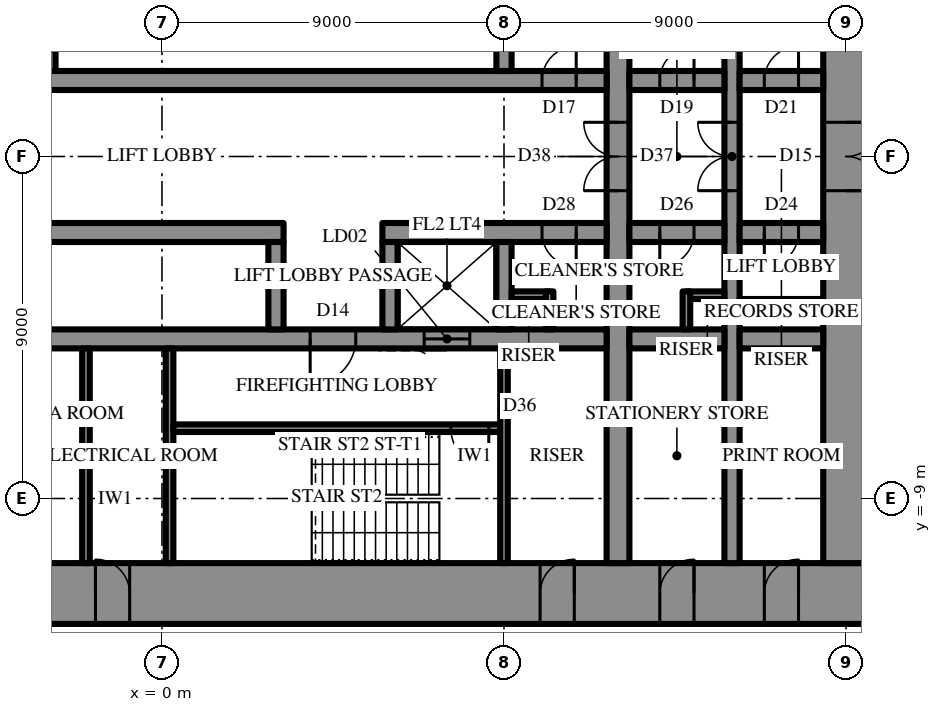
"""IFC4 building model, lengths in metres.
Left out: names, types, materials, properties, quantities, classifications, styles, units other than length and angle.
Written with IfcOpenShell. Run it as: python <this file> out.ifc"""

import sys

from ifc_helpers import new_model, si_unit, direction, frame, frame_2d, origin, place, context, subcontext, project, spatial, rectangle, extrude, element, fill, save


model = new_model("IFC4")
c1 = context("Model", 3, precision=1e-05, world=origin(), true_north=direction((0.0, 1.0)))
c2 = subcontext(c1, "Body", "Model", "MODEL_VIEW")
j1 = project(units=[si_unit("LENGTHUNIT", "METRE"), si_unit("PLANEANGLEUNIT", "RADIAN")], contexts=[c1])
p1 = place(None, origin())
s1 = spatial("IfcSite", under=j1, at=p1, CompositionType="ELEMENT")
p2 = place(p1, origin())
s2 = spatial("IfcBuilding", under=s1, at=p2, CompositionType="ELEMENT")
p3 = place(p2, frame((0.0, 0.0, -9.0)))
s3 = spatial("IfcBuildingStorey", under=s2, at=p3, CompositionType="ELEMENT", Elevation=-9.0)
p4 = place(p3, frame((18.6, -11.5, 0.0), z_axis=(0.0, 0.0, 1.0), x_axis=(-1.0, 0.0, 0.0)))
e1 = element("IfcWall", 1, at=p4, inside=s3, PredefinedType="SHEAR", context=c2, shape_type="SweptSolid", body=[
    extrude(rectangle(XDim=37.2, YDim=1.6, at=frame_2d((18.6, 0.0))), origin(), (0.0, 0.0, 1.0), 4.5),
])
p5 = place(p4, frame((19.45, 0.0, 0.0)))
e2 = element("IfcOpeningElement", 2, at=p5, cuts=e1, PredefinedType="OPENING", context=c2, shape_type="SweptSolid", body=[
    extrude(rectangle(XDim=0.9, YDim=2.2, at=frame_2d((0.45, 1.1))), frame((0.0, 0.81, 0.0), z_axis=(0.0, -1.0, 0.0), x_axis=(1.0, 0.0, 0.0)), (0.0, 0.0, 1.0), 1.62),
])
p6 = place(p4, frame((22.45, 0.0, 0.0)))
e3 = element("IfcOpeningElement", 3, at=p6, cuts=e1, PredefinedType="OPENING", context=c2, shape_type="SweptSolid", body=[
    extrude(rectangle(XDim=0.9, YDim=2.2, at=frame_2d((0.45, 1.1))), frame((0.0, 0.81, 0.0), z_axis=(0.0, -1.0, 0.0), x_axis=(1.0, 0.0, 0.0)), (0.0, 0.0, 1.0), 1.62),
])
p7 = place(p4, frame((25.5, 0.0, 0.0)))
e4 = element("IfcOpeningElement", 4, at=p7, cuts=e1, PredefinedType="OPENING", context=c2, shape_type="SweptSolid", body=[
    extrude(rectangle(XDim=1.0, YDim=2.2, at=frame_2d((0.5, 1.1))), frame((0.0, 0.81, 0.0), z_axis=(0.0, -1.0, 0.0), x_axis=(1.0, 0.0, 0.0)), (0.0, 0.0, 1.0), 1.62),
])
p8 = place(p4, frame((1.85, 0.0, 0.0)))
e5 = element("IfcOpeningElement", 5, at=p8, cuts=e1, PredefinedType="OPENING", context=c2, shape_type="SweptSolid", body=[
    extrude(rectangle(XDim=0.9, YDim=2.2, at=frame_2d((0.45, 1.1))), frame((0.0, 0.81, 0.0), z_axis=(0.0, -1.0, 0.0), x_axis=(1.0, 0.0, 0.0)), (0.0, 0.0, 1.0), 1.62),
])
p9 = place(p4, frame((4.6, 0.0, 0.0)))
e6 = element("IfcOpeningElement", 6, at=p9, cuts=e1, PredefinedType="OPENING", context=c2, shape_type="SweptSolid", body=[
    extrude(rectangle(XDim=0.9, YDim=2.2, at=frame_2d((0.45, 1.1))), frame((0.0, 0.81, 0.0), z_axis=(0.0, -1.0, 0.0), x_axis=(1.0, 0.0, 0.0)), (0.0, 0.0, 1.0), 1.62),
])
p10 = place(p4, frame((7.75, 0.0, 0.0)))
e7 = element("IfcOpeningElement", 7, at=p10, cuts=e1, PredefinedType="OPENING", context=c2, shape_type="SweptSolid", body=[
    extrude(rectangle(XDim=0.9, YDim=2.2, at=frame_2d((0.45, 1.1))), frame((0.0, 0.81, 0.0), z_axis=(0.0, -1.0, 0.0), x_axis=(1.0, 0.0, 0.0)), (0.0, 0.0, 1.0), 1.62),
])
p11 = place(p4, frame((28.55, 0.0, 0.0)))
e8 = element("IfcOpeningElement", 8, at=p11, cuts=e1, PredefinedType="OPENING", context=c2, shape_type="SweptSolid", body=[
    extrude(rectangle(XDim=0.9, YDim=2.2, at=frame_2d((0.45, 1.1))), frame((0.0, 0.81, 0.0), z_axis=(0.0, -1.0, 0.0), x_axis=(1.0, 0.0, 0.0)), (0.0, 0.0, 1.0), 1.62),
])
p12 = place(p4, frame((31.7, 0.0, 0.0)))
e9 = element("IfcOpeningElement", 9, at=p12, cuts=e1, PredefinedType="OPENING", context=c2, shape_type="SweptSolid", body=[
    extrude(rectangle(XDim=0.9, YDim=2.2, at=frame_2d((0.45, 1.1))), frame((0.0, 0.81, 0.0), z_axis=(0.0, -1.0, 0.0), x_axis=(1.0, 0.0, 0.0)), (0.0, 0.0, 1.0), 1.62),
])
p13 = place(p4, frame((34.45, 0.0, 0.0)))
e10 = element("IfcOpeningElement", 10, at=p13, cuts=e1, PredefinedType="OPENING", context=c2, shape_type="SweptSolid", body=[
    extrude(rectangle(XDim=0.9, YDim=2.2, at=frame_2d((0.45, 1.1))), frame((0.0, 0.81, 0.0), z_axis=(0.0, -1.0, 0.0), x_axis=(1.0, 0.0, 0.0)), (0.0, 0.0, 1.0), 1.62),
])
p14 = place(p3, frame((18.0, -10.7, 0.0), z_axis=(0.0, 0.0, 1.0), x_axis=(0.0, 1.0, 0.0)))
e11 = element("IfcWall", 11, at=p14, inside=s3, PredefinedType="SHEAR", context=c2, shape_type="SweptSolid", body=[
    extrude(rectangle(XDim=21.4, YDim=1.2, at=frame_2d((10.7, 0.0))), origin(), (0.0, 0.0, 1.0), 4.5),
])
p15 = place(p14, frame((9.8, 0.0, 0.0)))
e12 = element("IfcOpeningElement", 12, at=p15, cuts=e11, PredefinedType="OPENING", context=c2, shape_type="SweptSolid", body=[
    extrude(rectangle(XDim=1.8, YDim=2.4, at=frame_2d((0.9, 1.2))), frame((0.0, 0.61, 0.0), z_axis=(0.0, -1.0, 0.0), x_axis=(1.0, 0.0, 0.0)), (0.0, 0.0, 1.0), 1.22),
])
p16 = place(p3, frame((12.0, -10.7, 0.0), z_axis=(0.0, 0.0, 1.0), x_axis=(0.0, 1.0, 0.0)))
e13 = element("IfcWall", 13, at=p16, inside=s3, PredefinedType="SHEAR", context=c2, shape_type="SweptSolid", body=[
    extrude(rectangle(XDim=21.4, YDim=0.6, at=frame_2d((10.7, 0.0))), origin(), (0.0, 0.0, 1.0), 4.5),
])
p17 = place(p16, frame((9.8, 0.0, 0.0)))
e14 = element("IfcOpeningElement", 14, at=p17, cuts=e13, PredefinedType="OPENING", context=c2, shape_type="SweptSolid", body=[
    extrude(rectangle(XDim=1.8, YDim=2.4, at=frame_2d((0.9, 1.2))), frame((0.0, 0.31, 0.0), z_axis=(0.0, -1.0, 0.0), x_axis=(1.0, 0.0, 0.0)), (0.0, 0.0, 1.0), 0.62),
])
p18 = place(p3, frame((15.0, -10.7, 0.0), z_axis=(0.0, 0.0, 1.0), x_axis=(0.0, 1.0, 0.0)))
e15 = element("IfcWall", 15, at=p18, inside=s3, PredefinedType="SHEAR", context=c2, shape_type="SweptSolid", body=[
    extrude(rectangle(XDim=21.4, YDim=0.4, at=frame_2d((10.7, 0.0))), origin(), (0.0, 0.0, 1.0), 4.5),
])
p19 = place(p18, frame((9.8, 0.0, 0.0)))
e16 = element("IfcOpeningElement", 16, at=p19, cuts=e15, PredefinedType="OPENING", context=c2, shape_type="SweptSolid", body=[
    extrude(rectangle(XDim=1.8, YDim=2.4, at=frame_2d((0.9, 1.2))), frame((0.0, 0.21, 0.0), z_axis=(0.0, -1.0, 0.0), x_axis=(1.0, 0.0, 0.0)), (0.0, 0.0, 1.0), 0.42),
])
p20 = place(p3, frame((-3.2, 2.0, 0.0), z_axis=(0.0, 0.0, 1.0), x_axis=(1.0, 0.0, 0.0)))
e17 = element("IfcWall", 17, at=p20, inside=s3, PredefinedType="SHEAR", context=c2, shape_type="SweptSolid", body=[
    extrude(rectangle(XDim=14.9, YDim=0.5, at=frame_2d((7.45, 0.0))), origin(), (0.0, 0.0, 1.0), 4.5),
])
p21 = place(p20, frame((13.2, 0.0, 0.0)))
e18 = element("IfcOpeningElement", 18, at=p21, cuts=e17, PredefinedType="OPENING", context=c2, shape_type="SweptSolid", body=[
    extrude(rectangle(XDim=0.9, YDim=2.2, at=frame_2d((0.45, 1.1))), frame((0.0, 0.26, 0.0), z_axis=(0.0, -1.0, 0.0), x_axis=(1.0, 0.0, 0.0)), (0.0, 0.0, 1.0), 0.52),
])
p22 = place(p3, frame((12.3, 2.0, 0.0), z_axis=(0.0, 0.0, 1.0), x_axis=(1.0, 0.0, 0.0)))
e19 = element("IfcWall", 19, at=p22, inside=s3, PredefinedType="SHEAR", context=c2, shape_type="SweptSolid", body=[
    extrude(rectangle(XDim=2.5, YDim=0.5, at=frame_2d((1.25, 0.0))), origin(), (0.0, 0.0, 1.0), 4.5),
])
p23 = place(p22, frame((0.8, 0.0, 0.0)))
e20 = element("IfcOpeningElement", 20, at=p23, cuts=e19, PredefinedType="OPENING", context=c2, shape_type="SweptSolid", body=[
    extrude(rectangle(XDim=0.9, YDim=2.2, at=frame_2d((0.45, 1.1))), frame((0.0, 0.26, 0.0), z_axis=(0.0, -1.0, 0.0), x_axis=(1.0, 0.0, 0.0)), (0.0, 0.0, 1.0), 0.52),
])
p24 = place(p3, frame((15.2, 2.0, 0.0), z_axis=(0.0, 0.0, 1.0), x_axis=(1.0, 0.0, 0.0)))
e21 = element("IfcWall", 21, at=p24, inside=s3, PredefinedType="SHEAR", context=c2, shape_type="SweptSolid", body=[
    extrude(rectangle(XDim=2.2, YDim=0.5, at=frame_2d((1.1, 0.0))), origin(), (0.0, 0.0, 1.0), 4.5),
])
p25 = place(p24, frame((0.65, 0.0, 0.0)))
e22 = element("IfcOpeningElement", 22, at=p25, cuts=e21, PredefinedType="OPENING", context=c2, shape_type="SweptSolid", body=[
    extrude(rectangle(XDim=0.9, YDim=2.2, at=frame_2d((0.45, 1.1))), frame((0.0, 0.26, 0.0), z_axis=(0.0, -1.0, 0.0), x_axis=(1.0, 0.0, 0.0)), (0.0, 0.0, 1.0), 0.52),
])
for number, where, z_axis, x_axis in (
    (23, (-3.0, 2.25, 0.0), (0.0, 0.0, 1.0), (0.0, 1.0, 0.0)),
    (24, (9.0, 2.25, 0.0), (0.0, 0.0, 1.0), (0.0, 1.0, 0.0)),
):
    element("IfcWall", number, at=place(p3, frame(where, z_axis=z_axis, x_axis=x_axis)), inside=s3, PredefinedType="SHEAR", context=c2, shape_type="SweptSolid", body=[
        extrude(rectangle(XDim=2.3, YDim=0.4, at=frame_2d((1.15, 0.0))), origin(), (0.0, 0.0, 1.0), 4.5),
    ])
p26 = place(p3, frame((17.4, -2.0, 0.0), z_axis=(0.0, 0.0, 1.0), x_axis=(-1.0, 0.0, 0.0)))
e25 = element("IfcWall", 25, at=p26, inside=s3, PredefinedType="SHEAR", context=c2, shape_type="SweptSolid", body=[
    extrude(rectangle(XDim=2.2, YDim=0.5, at=frame_2d((1.1, 0.0))), origin(), (0.0, 0.0, 1.0), 4.5),
])
p27 = place(p26, frame((0.65, 0.0, 0.0)))
e26 = element("IfcOpeningElement", 26, at=p27, cuts=e25, PredefinedType="OPENING", context=c2, shape_type="SweptSolid", body=[
    extrude(rectangle(XDim=0.9, YDim=2.2, at=frame_2d((0.45, 1.1))), frame((0.0, 0.26, 0.0), z_axis=(0.0, -1.0, 0.0), x_axis=(1.0, 0.0, 0.0)), (0.0, 0.0, 1.0), 0.52),
])
p28 = place(p3, frame((14.8, -2.0, 0.0), z_axis=(0.0, 0.0, 1.0), x_axis=(-1.0, 0.0, 0.0)))
e27 = element("IfcWall", 27, at=p28, inside=s3, PredefinedType="SHEAR", context=c2, shape_type="SweptSolid", body=[
    extrude(rectangle(XDim=2.5, YDim=0.5, at=frame_2d((1.25, 0.0))), origin(), (0.0, 0.0, 1.0), 4.5),
])
p29 = place(p28, frame((0.8, 0.0, 0.0)))
e28 = element("IfcOpeningElement", 28, at=p29, cuts=e27, PredefinedType="OPENING", context=c2, shape_type="SweptSolid", body=[
    extrude(rectangle(XDim=0.9, YDim=2.2, at=frame_2d((0.45, 1.1))), frame((0.0, 0.26, 0.0), z_axis=(0.0, -1.0, 0.0), x_axis=(1.0, 0.0, 0.0)), (0.0, 0.0, 1.0), 0.52),
])
p30 = place(p3, frame((11.7, -2.0, 0.0), z_axis=(0.0, 0.0, 1.0), x_axis=(-1.0, 0.0, 0.0)))
e29 = element("IfcWall", 29, at=p30, inside=s3, PredefinedType="SHEAR", context=c2, shape_type="SweptSolid", body=[
    extrude(rectangle(XDim=5.9, YDim=0.5, at=frame_2d((2.95, 0.0))), origin(), (0.0, 0.0, 1.0), 4.5),
])
p31 = place(p30, frame((0.8, 0.0, 0.0)))
e30 = element("IfcOpeningElement", 30, at=p31, cuts=e29, PredefinedType="OPENING", context=c2, shape_type="SweptSolid", body=[
    extrude(rectangle(XDim=0.9, YDim=2.2, at=frame_2d((0.45, 1.1))), frame((0.0, 0.26, 0.0), z_axis=(0.0, -1.0, 0.0), x_axis=(1.0, 0.0, 0.0)), (0.0, 0.0, 1.0), 0.52),
])
p32 = place(p3, frame((3.2, -2.0, 0.0), z_axis=(0.0, 0.0, 1.0), x_axis=(-1.0, 0.0, 0.0)))
e31 = element("IfcWall", 31, at=p32, inside=s3, PredefinedType="SHEAR", context=c2, shape_type="SweptSolid", body=[
    extrude(rectangle(XDim=14.9, YDim=0.5, at=frame_2d((7.45, 0.0))), origin(), (0.0, 0.0, 1.0), 4.5),
])
p33 = place(p32, frame((13.2, 0.0, 0.0)))
e32 = element("IfcOpeningElement", 32, at=p33, cuts=e31, PredefinedType="OPENING", context=c2, shape_type="SweptSolid", body=[
    extrude(rectangle(XDim=0.9, YDim=2.2, at=frame_2d((0.45, 1.1))), frame((0.0, 0.26, 0.0), z_axis=(0.0, -1.0, 0.0), x_axis=(1.0, 0.0, 0.0)), (0.0, 0.0, 1.0), 0.52),
])
p34 = place(p3, frame((17.4, -4.8, 0.0), z_axis=(0.0, 0.0, 1.0), x_axis=(-1.0, 0.0, 0.0)))
e33 = element("IfcWall", 33, at=p34, inside=s3, PredefinedType="SHEAR", context=c2, shape_type="SweptSolid", body=[
    extrude(rectangle(XDim=2.2, YDim=0.5, at=frame_2d((1.1, 0.0))), origin(), (0.0, 0.0, 1.0), 4.5),
])
p35 = place(p3, frame((14.8, -4.8, 0.0), z_axis=(0.0, 0.0, 1.0), x_axis=(-1.0, 0.0, 0.0)))
e34 = element("IfcWall", 34, at=p35, inside=s3, PredefinedType="SHEAR", context=c2, shape_type="SweptSolid", body=[
    extrude(rectangle(XDim=2.5, YDim=0.5, at=frame_2d((1.25, 0.0))), origin(), (0.0, 0.0, 1.0), 4.5),
])
p36 = place(p3, frame((11.7, -4.8, 0.0), z_axis=(0.0, 0.0, 1.0), x_axis=(-1.0, 0.0, 0.0)))
e35 = element("IfcWall", 35, at=p36, inside=s3, PredefinedType="SHEAR", context=c2, shape_type="SweptSolid", body=[
    extrude(rectangle(XDim=23.4, YDim=0.5, at=frame_2d((11.7, 0.0))), origin(), (0.0, 0.0, 1.0), 4.5),
])
p37 = place(p36, frame((6.6, 0.0, 0.0)))
e36 = element("IfcOpeningElement", 36, at=p37, cuts=e35, PredefinedType="OPENING", context=c2, shape_type="SweptSolid", body=[
    extrude(rectangle(XDim=1.2, YDim=2.2, at=frame_2d((0.6, 1.1))), frame((0.0, 0.26, 0.0), z_axis=(0.0, -1.0, 0.0), x_axis=(1.0, 0.0, 0.0)), (0.0, 0.0, 1.0), 0.52),
])
p38 = place(p36, frame((3.6, 0.0, 0.0)))
e37 = element("IfcOpeningElement", 37, at=p38, cuts=e35, PredefinedType="OPENING", context=c2, shape_type="SweptSolid", body=[
    extrude(rectangle(XDim=1.2, YDim=2.2, at=frame_2d((0.6, 1.1))), frame((0.0, 0.26, 0.0), z_axis=(0.0, -1.0, 0.0), x_axis=(1.0, 0.0, 0.0)), (0.0, 0.0, 1.0), 0.52),
])
for number, where, z_axis, x_axis in (
    (38, (9.0, -2.25, 0.0), (0.0, 0.0, 1.0), (0.0, -1.0, 0.0)),
    (39, (6.0, -2.25, 0.0), (0.0, 0.0, 1.0), (0.0, -1.0, 0.0)),
    (40, (3.0, -2.25, 0.0), (0.0, 0.0, 1.0), (0.0, -1.0, 0.0)),
):
    element("IfcWall", number, at=place(p3, frame(where, z_axis=z_axis, x_axis=x_axis)), inside=s3, PredefinedType="SHEAR", context=c2, shape_type="SweptSolid", body=[
        extrude(rectangle(XDim=2.3, YDim=0.4, at=frame_2d((1.15, 0.0))), origin(), (0.0, 0.0, 1.0), 4.5),
    ])
p39 = place(p3, frame((0.2, -5.05, 0.0), z_axis=(0.0, 0.0, 1.0), x_axis=(0.0, -1.0, 0.0)))
e41 = element("IfcWall", 41, at=p39, inside=s3, PredefinedType="SHEAR", context=c2, shape_type="SweptSolid", body=[
    extrude(rectangle(XDim=5.65, YDim=0.2, at=frame_2d((2.825, 0.0))), origin(), (0.0, 0.0, 1.0), 4.5),
])
p40 = place(p3, frame((8.9, -7.15, 0.0), z_axis=(0.0, 0.0, 1.0), x_axis=(-1.0, 0.0, 0.0)))
e42 = element("IfcWall", 42, at=p40, inside=s3, PredefinedType="SHEAR", context=c2, shape_type="SweptSolid", body=[
    extrude(rectangle(XDim=8.6, YDim=0.2, at=frame_2d((4.3, 0.0))), origin(), (0.0, 0.0, 1.0), 4.5),
])
p41 = place(p40, frame((0.3, 0.0, 0.0)))
e43 = element("IfcOpeningElement", 43, at=p41, cuts=e42, PredefinedType="OPENING", context=c2, shape_type="SweptSolid", body=[
    extrude(rectangle(XDim=1.0, YDim=2.2, at=frame_2d((0.5, 1.1))), frame((0.0, 0.11, 0.0), z_axis=(0.0, -1.0, 0.0), x_axis=(1.0, 0.0, 0.0)), (0.0, 0.0, 1.0), 0.22),
])
for number, where, z_axis, x_axis in (
    (44, (9.0, -5.05, 0.0), (0.0, 0.0, 1.0), (0.0, -1.0, 0.0)),
    (45, (-2.0, -5.05, 0.0), (0.0, 0.0, 1.0), (0.0, -1.0, 0.0)),
):
    element("IfcWall", number, at=place(p3, frame(where, z_axis=z_axis, x_axis=x_axis)), inside=s3, PredefinedType="PARTITIONING", context=c2, shape_type="SweptSolid", body=[
        extrude(rectangle(XDim=5.65, YDim=0.2, at=frame_2d((2.825, 0.0))), origin(), (0.0, 0.0, 1.0), 4.15),
    ])
p42 = place(p3, frame((17.4, -3.85, 0.0), z_axis=(0.0, 0.0, 1.0), x_axis=(-1.0, 0.0, 0.0)))
e46 = element("IfcWall", 46, at=p42, inside=s3, PredefinedType="PARTITIONING", context=c2, shape_type="SweptSolid", body=[
    extrude(rectangle(XDim=2.2, YDim=0.2, at=frame_2d((1.1, 0.0))), origin(), (0.0, 0.0, 1.0), 4.15),
])
for number, where, z_axis, x_axis in (
    (47, (14.8, -3.65, 0.0), (0.0, 0.0, 1.0), (-1.0, 0.0, 0.0)),
    (48, (13.8, -3.55, 0.0), (0.0, 0.0, 1.0), (0.0, -1.0, 0.0)),
    (49, (10.2, -3.65, 0.0), (0.0, 0.0, 1.0), (-1.0, 0.0, 0.0)),
    (50, (10.2, -3.55, 0.0), (0.0, 0.0, 1.0), (0.0, -1.0, 0.0)),
):
    element("IfcWall", number, at=place(p3, frame(where, z_axis=z_axis, x_axis=x_axis)), inside=s3, PredefinedType="PARTITIONING", context=c2, shape_type="SweptSolid", body=[
        extrude(rectangle(XDim=1.0, YDim=0.2, at=frame_2d((0.5, 0.0))), origin(), (0.0, 0.0, 1.0), 4.15),
    ])
p43 = place(p15, frame((1.8, 0.0, 0.0), z_axis=(0.0, 0.0, 1.0), x_axis=(-1.0, 0.0, 0.0)))
e51 = element("IfcDoor", 51, at=p43, inside=s3, OperationType="DOUBLE_DOOR_SINGLE_SWING", PredefinedType="DOOR", context=c2, shape_type="SweptSolid", body=[
    extrude(rectangle(XDim=1.8, YDim=2.4, at=frame_2d((0.9, 1.2))), frame((0.0, 0.025, 0.0), z_axis=(0.0, -1.0, 0.0), x_axis=(1.0, 0.0, 0.0)), (0.0, 0.0, 1.0), 0.05),
])
fill(e12, e51)
p44 = place(p37, origin())
e52 = element("IfcDoor", 52, at=p44, inside=s3, OperationType="SINGLE_SWING_LEFT", PredefinedType="DOOR", context=c2, shape_type="SweptSolid", body=[
    extrude(rectangle(XDim=1.2, YDim=2.2, at=frame_2d((0.6, 1.1))), frame((0.0, 0.025, 0.0), z_axis=(0.0, -1.0, 0.0), x_axis=(1.0, 0.0, 0.0)), (0.0, 0.0, 1.0), 0.05),
])
fill(e36, e52)
p45 = place(p41, origin())
e53 = element("IfcDoor", 53, at=p45, inside=s3, OperationType="SINGLE_SWING_RIGHT", PredefinedType="DOOR", context=c2, shape_type="SweptSolid", body=[
    extrude(rectangle(XDim=1.0, YDim=2.2, at=frame_2d((0.5, 1.1))), frame((0.0, 0.025, 0.0), z_axis=(0.0, -1.0, 0.0), x_axis=(1.0, 0.0, 0.0)), (0.0, 0.0, 1.0), 0.05),
])
fill(e43, e53)
p46 = place(p5, frame((0.9, 0.0, 0.0), z_axis=(0.0, 0.0, 1.0), x_axis=(-1.0, 0.0, 0.0)))
e54 = element("IfcDoor", 54, at=p46, inside=s3, OperationType="SINGLE_SWING_RIGHT", PredefinedType="DOOR", context=c2, shape_type="SweptSolid", body=[
    extrude(rectangle(XDim=0.9, YDim=2.2, at=frame_2d((0.45, 1.1))), frame((0.0, 0.025, 0.0), z_axis=(0.0, -1.0, 0.0), x_axis=(1.0, 0.0, 0.0)), (0.0, 0.0, 1.0), 0.05),
])
fill(e2, e54)
p47 = place(p8, frame((0.9, 0.0, 0.0), z_axis=(0.0, 0.0, 1.0), x_axis=(-1.0, 0.0, 0.0)))
e55 = element("IfcDoor", 55, at=p47, inside=s3, OperationType="SINGLE_SWING_LEFT", PredefinedType="DOOR", context=c2, shape_type="SweptSolid", body=[
    extrude(rectangle(XDim=0.9, YDim=2.2, at=frame_2d((0.45, 1.1))), frame((0.0, 0.025, 0.0), z_axis=(0.0, -1.0, 0.0), x_axis=(1.0, 0.0, 0.0)), (0.0, 0.0, 1.0), 0.05),
])
fill(e5, e55)
p48 = place(p9, frame((0.9, 0.0, 0.0), z_axis=(0.0, 0.0, 1.0), x_axis=(-1.0, 0.0, 0.0)))
e56 = element("IfcDoor", 56, at=p48, inside=s3, OperationType="SINGLE_SWING_LEFT", PredefinedType="DOOR", context=c2, shape_type="SweptSolid", body=[
    extrude(rectangle(XDim=0.9, YDim=2.2, at=frame_2d((0.45, 1.1))), frame((0.0, 0.025, 0.0), z_axis=(0.0, -1.0, 0.0), x_axis=(1.0, 0.0, 0.0)), (0.0, 0.0, 1.0), 0.05),
])
fill(e6, e56)
p49 = place(p10, frame((0.9, 0.0, 0.0), z_axis=(0.0, 0.0, 1.0), x_axis=(-1.0, 0.0, 0.0)))
e57 = element("IfcDoor", 57, at=p49, inside=s3, OperationType="SINGLE_SWING_LEFT", PredefinedType="DOOR", context=c2, shape_type="SweptSolid", body=[
    extrude(rectangle(XDim=0.9, YDim=2.2, at=frame_2d((0.45, 1.1))), frame((0.0, 0.025, 0.0), z_axis=(0.0, -1.0, 0.0), x_axis=(1.0, 0.0, 0.0)), (0.0, 0.0, 1.0), 0.05),
])
fill(e7, e57)
p50 = place(p21, origin())
e58 = element("IfcDoor", 58, at=p50, inside=s3, OperationType="SINGLE_SWING_LEFT", PredefinedType="DOOR", context=c2, shape_type="SweptSolid", body=[
    extrude(rectangle(XDim=0.9, YDim=2.2, at=frame_2d((0.45, 1.1))), frame((0.0, 0.025, 0.0), z_axis=(0.0, -1.0, 0.0), x_axis=(1.0, 0.0, 0.0)), (0.0, 0.0, 1.0), 0.05),
])
fill(e18, e58)
p51 = place(p23, origin())
e59 = element("IfcDoor", 59, at=p51, inside=s3, OperationType="SINGLE_SWING_LEFT", PredefinedType="DOOR", context=c2, shape_type="SweptSolid", body=[
    extrude(rectangle(XDim=0.9, YDim=2.2, at=frame_2d((0.45, 1.1))), frame((0.0, 0.025, 0.0), z_axis=(0.0, -1.0, 0.0), x_axis=(1.0, 0.0, 0.0)), (0.0, 0.0, 1.0), 0.05),
])
fill(e20, e59)
p52 = place(p25, origin())
e60 = element("IfcDoor", 60, at=p52, inside=s3, OperationType="SINGLE_SWING_LEFT", PredefinedType="DOOR", context=c2, shape_type="SweptSolid", body=[
    extrude(rectangle(XDim=0.9, YDim=2.2, at=frame_2d((0.45, 1.1))), frame((0.0, 0.025, 0.0), z_axis=(0.0, -1.0, 0.0), x_axis=(1.0, 0.0, 0.0)), (0.0, 0.0, 1.0), 0.05),
])
fill(e22, e60)
p53 = place(p27, origin())
e61 = element("IfcDoor", 61, at=p53, inside=s3, OperationType="SINGLE_SWING_LEFT", PredefinedType="DOOR", context=c2, shape_type="SweptSolid", body=[
    extrude(rectangle(XDim=0.9, YDim=2.2, at=frame_2d((0.45, 1.1))), frame((0.0, 0.025, 0.0), z_axis=(0.0, -1.0, 0.0), x_axis=(1.0, 0.0, 0.0)), (0.0, 0.0, 1.0), 0.05),
])
fill(e26, e61)
p54 = place(p29, origin())
e62 = element("IfcDoor", 62, at=p54, inside=s3, OperationType="SINGLE_SWING_LEFT", PredefinedType="DOOR", context=c2, shape_type="SweptSolid", body=[
    extrude(rectangle(XDim=0.9, YDim=2.2, at=frame_2d((0.45, 1.1))), frame((0.0, 0.025, 0.0), z_axis=(0.0, -1.0, 0.0), x_axis=(1.0, 0.0, 0.0)), (0.0, 0.0, 1.0), 0.05),
])
fill(e28, e62)
p55 = place(p31, origin())
e63 = element("IfcDoor", 63, at=p55, inside=s3, OperationType="SINGLE_SWING_RIGHT", PredefinedType="DOOR", context=c2, shape_type="SweptSolid", body=[
    extrude(rectangle(XDim=0.9, YDim=2.2, at=frame_2d((0.45, 1.1))), frame((0.0, 0.025, 0.0), z_axis=(0.0, -1.0, 0.0), x_axis=(1.0, 0.0, 0.0)), (0.0, 0.0, 1.0), 0.05),
])
fill(e30, e63)
p56 = place(p17, origin())
e64 = element("IfcDoor", 64, at=p56, inside=s3, OperationType="DOUBLE_DOOR_SINGLE_SWING", PredefinedType="DOOR", context=c2, shape_type="SweptSolid", body=[
    extrude(rectangle(XDim=1.8, YDim=2.4, at=frame_2d((0.9, 1.2))), frame((0.0, 0.025, 0.0), z_axis=(0.0, -1.0, 0.0), x_axis=(1.0, 0.0, 0.0)), (0.0, 0.0, 1.0), 0.05),
])
fill(e14, e64)
p57 = place(p19, origin())
e65 = element("IfcDoor", 65, at=p57, inside=s3, OperationType="DOUBLE_DOOR_SINGLE_SWING", PredefinedType="DOOR", context=c2, shape_type="SweptSolid", body=[
    extrude(rectangle(XDim=1.8, YDim=2.4, at=frame_2d((0.9, 1.2))), frame((0.0, 0.025, 0.0), z_axis=(0.0, -1.0, 0.0), x_axis=(1.0, 0.0, 0.0)), (0.0, 0.0, 1.0), 0.05),
])
fill(e16, e65)
p58 = place(p38, origin())
e66 = element("IfcDoor", 66, at=p58, inside=s3, OperationType="SLIDING_TO_LEFT", PredefinedType="DOOR", context=c2, shape_type="SweptSolid", body=[
    extrude(rectangle(XDim=1.2, YDim=2.2, at=frame_2d((0.6, 1.1))), frame((0.0, 0.025, 0.0), z_axis=(0.0, -1.0, 0.0), x_axis=(1.0, 0.0, 0.0)), (0.0, 0.0, 1.0), 0.05),
])
fill(e37, e66)
save(model, sys.argv[1])
